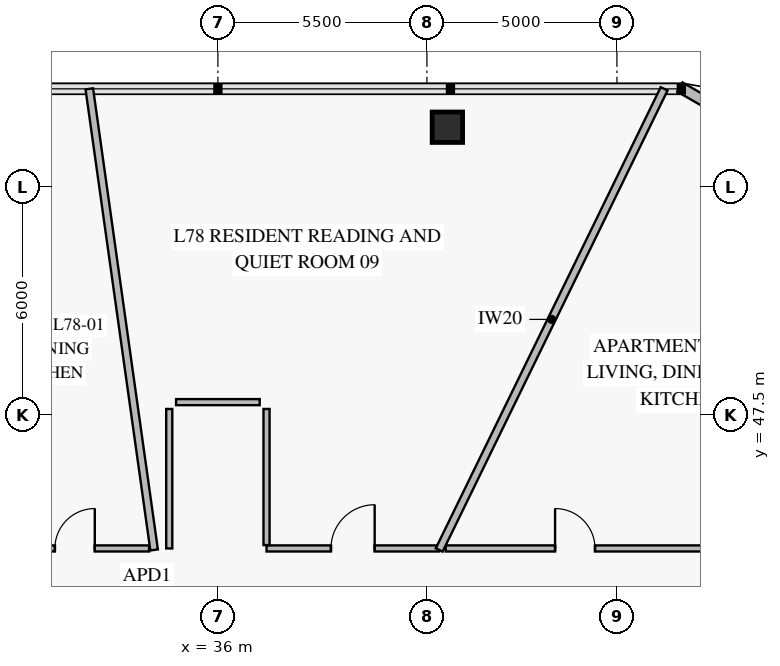
"""IFC4 building model, lengths in metres.
Left out: names, types, materials, properties, quantities, classifications, styles, units other than length and angle.
Written with IfcOpenShell. Run it as: python <this file> out.ifc"""

import sys

from ifc_helpers import new_model, si_unit, direction, frame, frame_2d, origin, origin_2d, place, context, subcontext, project, spatial, rectangle, extrude, element, fill, save


model = new_model("IFC4")
c1 = context("Model", 3, precision=1e-05, world=origin(), true_north=direction((0.0, 1.0)))
c2 = subcontext(c1, "Body", "Model", "MODEL_VIEW")
j1 = project(units=[si_unit("LENGTHUNIT", "METRE"), si_unit("PLANEANGLEUNIT", "RADIAN")], contexts=[c1])
p1 = place(None, origin())
s1 = spatial("IfcSite", under=j1, at=p1, CompositionType="ELEMENT")
p2 = place(p1, origin())
s2 = spatial("IfcBuilding", under=s1, at=p2, CompositionType="ELEMENT")
p3 = place(p2, frame((0.0, 0.0, 308.2)))
s3 = spatial("IfcBuildingStorey", under=s2, at=p3, CompositionType="ELEMENT", Elevation=308.2)
p4 = place(p3, frame((42.039, 55.064, 0.0), z_axis=(0.0, 0.0, 1.0), x_axis=(-1.0, 0.0, 0.0)))
e1 = element("IfcColumn", 1, at=p4, inside=s3, PredefinedType="COLUMN", context=c2, shape_type="SweptSolid", body=[
    extrude(rectangle(XDim=0.8, YDim=0.8, at=origin_2d()), origin(), (0.0, 0.0, 1.0), 3.55),
])
p5 = place(p3, frame((48.157, 56.122, 0.0), z_axis=(0.0, 0.0, 1.0), x_axis=(0.866023752521, -0.50000286006, 0.0)))
e2 = element("IfcWall", 2, at=p5, inside=s3, PredefinedType="SOLIDWALL", context=c2, shape_type="SweptSolid", body=[
    extrude(rectangle(XDim=3.065, YDim=0.28, at=frame_2d((1.532, 0.0))), origin(), (0.0, 0.0, 1.0), 3.55),
])
p6 = place(p3, frame((34.189, 43.98, 0.0), z_axis=(0.0, 0.0, 1.0), x_axis=(-1.0, 0.0, 0.0)))
e3 = element("IfcWall", 3, at=p6, inside=s3, PredefinedType="PARTITIONING", context=c2, shape_type="SweptSolid", body=[
    extrude(rectangle(XDim=3.907, YDim=0.16, at=frame_2d((1.954, 0.0))), origin(), (0.0, 0.0, 1.0), 3.0),
])
p7 = place(p6, frame((1.428, 0.0, 0.0)))
e4 = element("IfcOpeningElement", 4, at=p7, cuts=e3, PredefinedType="OPENING", context=c2, shape_type="SweptSolid", body=[
    extrude(rectangle(XDim=1.05, YDim=2.15, at=frame_2d((0.525, 1.075))), frame((0.0, 0.092, 0.0), z_axis=(0.0, -1.0, 0.0), x_axis=(1.0, 0.0, 0.0)), (0.0, 0.0, 1.0), 0.184),
])
p8 = place(p3, frame((48.8, 43.98, 0.0), z_axis=(0.0, 0.0, 1.0), x_axis=(-1.0, 0.0, 0.0)))
e5 = element("IfcWall", 5, at=p8, inside=s3, PredefinedType="PARTITIONING", context=c2, shape_type="SweptSolid", body=[
    extrude(rectangle(XDim=6.805, YDim=0.16, at=frame_2d((3.402, 0.0))), origin(), (0.0, 0.0, 1.0), 3.0),
])
p9 = place(p8, frame((2.877, 0.0, 0.0)))
e6 = element("IfcOpeningElement", 6, at=p9, cuts=e5, PredefinedType="OPENING", context=c2, shape_type="SweptSolid", body=[
    extrude(rectangle(XDim=1.05, YDim=2.15, at=frame_2d((0.525, 1.075))), frame((0.0, 0.092, 0.0), z_axis=(0.0, -1.0, 0.0), x_axis=(1.0, 0.0, 0.0)), (0.0, 0.0, 1.0), 0.184),
])
p10 = place(p3, frame((41.821, 43.98, 0.0), z_axis=(0.0, 0.0, 1.0), x_axis=(-1.0, 0.0, 0.0)))
e7 = element("IfcWall", 7, at=p10, inside=s3, PredefinedType="PARTITIONING", context=c2, shape_type="SweptSolid", body=[
    extrude(rectangle(XDim=4.541, YDim=0.16, at=frame_2d((2.271, 0.0))), origin(), (0.0, 0.0, 1.0), 3.0),
])
p11 = place(p10, frame((1.695, 0.0, 0.0)))
e8 = element("IfcOpeningElement", 8, at=p11, cuts=e7, PredefinedType="OPENING", context=c2, shape_type="SweptSolid", body=[
    extrude(rectangle(XDim=1.15, YDim=2.2, at=frame_2d((0.575, 1.1))), frame((0.0, 0.092, 0.0), z_axis=(0.0, -1.0, 0.0), x_axis=(1.0, 0.0, 0.0)), (0.0, 0.0, 1.0), 0.184),
])
p12 = place(p3, frame((34.322, 43.94, 0.0), z_axis=(0.0, 0.0, 1.0), x_axis=(-0.139169963781, 0.990268509638, 0.0)))
e9 = element("IfcWall", 9, at=p12, inside=s3, PredefinedType="PARTITIONING", context=c2, shape_type="SweptSolid", body=[
    extrude(rectangle(XDim=12.253, YDim=0.2, at=frame_2d((6.127, 0.0))), origin(), (0.0, 0.0, 1.0), 2.97),
])
p13 = place(p3, frame((41.823, 43.94, 0.0), z_axis=(0.0, 0.0, 1.0), x_axis=(0.438366981634, 0.898796077769, 0.0)))
e10 = element("IfcWall", 10, at=p13, inside=s3, PredefinedType="PARTITIONING", context=c2, shape_type="SweptSolid", body=[
    extrude(rectangle(XDim=13.5, YDim=0.2, at=frame_2d((6.75, 0.0))), origin(), (0.0, 0.0, 1.0), 2.97),
])
p14 = place(p3, frame((37.28, 44.068, 0.0), z_axis=(0.0, 0.0, 1.0), x_axis=(0.0, 1.0, 0.0)))
e11 = element("IfcWall", 11, at=p14, inside=s3, PredefinedType="PARTITIONING", context=c2, shape_type="SweptSolid", body=[
    extrude(rectangle(XDim=3.582, YDim=0.16, at=frame_2d((1.791, 0.0))), origin(), (0.0, 0.0, 1.0), 3.55),
])
p15 = place(p3, frame((34.72, 47.65, 0.0), z_axis=(0.0, 0.0, 1.0), x_axis=(0.0, -1.0, 0.0)))
e12 = element("IfcWall", 12, at=p15, inside=s3, PredefinedType="PARTITIONING", context=c2, shape_type="SweptSolid", body=[
    extrude(rectangle(XDim=3.67, YDim=0.16, at=frame_2d((1.835, 0.0))), origin(), (0.0, 0.0, 1.0), 3.55),
])
p16 = place(p3, frame((37.1, 47.83, 0.0), z_axis=(0.0, 0.0, 1.0), x_axis=(-1.0, 0.0, 0.0)))
e13 = element("IfcWall", 13, at=p16, inside=s3, PredefinedType="PARTITIONING", context=c2, shape_type="SweptSolid", body=[
    extrude(rectangle(XDim=2.2, YDim=0.16, at=frame_2d((1.1, 0.0))), origin(), (0.0, 0.0, 1.0), 3.55),
])
p17 = place(p7, frame((1.05, 0.0, 0.0), z_axis=(0.0, 0.0, 1.0), x_axis=(-1.0, 0.0, 0.0)))
e14 = element("IfcDoor", 14, at=p17, inside=s3, OperationType="SINGLE_SWING_RIGHT", PredefinedType="DOOR", context=c2, shape_type="SweptSolid", body=[
    extrude(rectangle(XDim=1.05, YDim=2.15, at=frame_2d((0.525, 1.075))), frame((0.0, 0.025, 0.0), z_axis=(0.0, -1.0, 0.0), x_axis=(1.0, 0.0, 0.0)), (0.0, 0.0, 1.0), 0.05),
])
fill(e4, e14)
p18 = place(p9, frame((1.05, 0.0, 0.0), z_axis=(0.0, 0.0, 1.0), x_axis=(-1.0, 0.0, 0.0)))
e15 = element("IfcDoor", 15, at=p18, inside=s3, OperationType="SINGLE_SWING_LEFT", PredefinedType="DOOR", context=c2, shape_type="SweptSolid", body=[
    extrude(rectangle(XDim=1.05, YDim=2.15, at=frame_2d((0.525, 1.075))), frame((0.0, 0.025, 0.0), z_axis=(0.0, -1.0, 0.0), x_axis=(1.0, 0.0, 0.0)), (0.0, 0.0, 1.0), 0.05),
])
fill(e6, e15)
p19 = place(p11, frame((1.15, 0.0, 0.0), z_axis=(0.0, 0.0, 1.0), x_axis=(-1.0, 0.0, 0.0)))
e16 = element("IfcDoor", 16, at=p19, inside=s3, OperationType="SINGLE_SWING_RIGHT", PredefinedType="DOOR", context=c2, shape_type="SweptSolid", body=[
    extrude(rectangle(XDim=1.15, YDim=2.2, at=frame_2d((0.575, 1.1))), frame((0.0, 0.025, 0.0), z_axis=(0.0, -1.0, 0.0), x_axis=(1.0, 0.0, 0.0)), (0.0, 0.0, 1.0), 0.05),
])
fill(e8, e16)
save(model, sys.argv[1])
